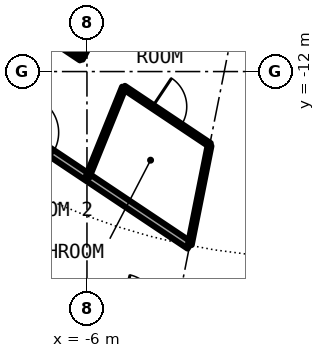
"""IFC4 building model, lengths in metres.
Left out: names, types, materials, properties, quantities, classifications, styles, units other than length and angle.
Written with IfcOpenShell. Run it as: python <this file> out.ifc"""

import sys

from ifc_helpers import new_model, si_unit, direction, frame, frame_2d, origin, place, context, subcontext, project, spatial, rectangle, extrude, element, fill, save


model = new_model("IFC4")
c1 = context("Model", 3, precision=1e-05, world=origin(), true_north=direction((0.0, 1.0)))
c2 = subcontext(c1, "Body", "Model", "MODEL_VIEW")
j1 = project(units=[si_unit("LENGTHUNIT", "METRE"), si_unit("PLANEANGLEUNIT", "RADIAN")], contexts=[c1])
p1 = place(None, origin())
s1 = spatial("IfcSite", under=j1, at=p1, CompositionType="ELEMENT")
p2 = place(p1, origin())
s2 = spatial("IfcBuilding", under=s1, at=p2, CompositionType="ELEMENT")
p3 = place(p2, frame((0.0, 0.0, 31.95)))
s3 = spatial("IfcBuildingStorey", under=s2, at=p3, CompositionType="ELEMENT", Elevation=31.95)
p4 = place(p3, frame((-9.242, -17.284, 0.0), z_axis=(0.0, 0.0, 1.0), x_axis=(0.970002158938, -0.243096301198, 0.0)))
e1 = element("IfcWall", 1, at=p4, inside=s3, PredefinedType="PARTITIONING", context=c2, shape_type="SweptSolid", body=[
    extrude(rectangle(XDim=9.528, YDim=0.2, at=frame_2d((4.764, 0.0))), origin(), (0.0, 0.0, 1.0), 2.38),
])
p5 = place(p4, frame((4.262, 0.0, 0.0)))
e2 = element("IfcOpeningElement", 2, at=p5, cuts=e1, PredefinedType="OPENING", context=c2, shape_type="SweptSolid", body=[
    extrude(rectangle(XDim=1.0, YDim=2.3, at=frame_2d((0.5, 1.15))), frame((0.0, 0.11, 0.0), z_axis=(0.0, -1.0, 0.0), x_axis=(1.0, 0.0, 0.0)), (0.0, 0.0, 1.0), 0.22),
])
p6 = place(p3, frame((-14.036, -9.402, 0.0), z_axis=(0.0, 0.0, 1.0), x_axis=(0.831561346449, -0.555432918625, 0.0)))
e3 = element("IfcWall", 3, at=p6, inside=s3, PredefinedType="PARTITIONING", context=c2, shape_type="SweptSolid", body=[
    extrude(rectangle(XDim=12.914, YDim=0.2, at=frame_2d((6.457, 0.0))), origin(), (0.0, 0.0, 1.0), 2.7),
])
p7 = place(p6, frame((7.566, 0.0, 0.0)))
e4 = element("IfcOpeningElement", 4, at=p7, cuts=e3, PredefinedType="OPENING", context=c2, shape_type="SweptSolid", body=[
    extrude(rectangle(XDim=1.0, YDim=2.3, at=frame_2d((0.5, 1.15))), frame((0.0, 0.11, 0.0), z_axis=(0.0, -1.0, 0.0), x_axis=(1.0, 0.0, 0.0)), (0.0, 0.0, 1.0), 0.22),
])
p8 = place(p3, frame((-9.545, -9.401, 0.0), z_axis=(0.0, 0.0, 1.0), x_axis=(0.831459707426, -0.555585056429, 0.0)))
e5 = element("IfcWall", 5, at=p8, inside=s3, PredefinedType="PARTITIONING", context=c2, shape_type="SweptSolid", body=[
    extrude(rectangle(XDim=4.073, YDim=0.1, at=frame_2d((2.037, 0.0))), origin(), (0.0, 0.0, 1.0), 2.7),
])
p9 = place(p3, frame((-5.029, -12.418, 0.0), z_axis=(0.0, 0.0, 1.0), x_axis=(0.831538390496, -0.555467285384, 0.0)))
e6 = element("IfcWall", 6, at=p9, inside=s3, PredefinedType="PARTITIONING", context=c2, shape_type="SweptSolid", body=[
    extrude(rectangle(XDim=2.717, YDim=0.1, at=frame_2d((1.358, 0.0))), origin(), (0.0, 0.0, 1.0), 2.7),
])
p10 = place(p9, frame((0.908, 0.0, 0.0)))
e7 = element("IfcOpeningElement", 7, at=p10, cuts=e6, PredefinedType="OPENING", context=c2, shape_type="SweptSolid", body=[
    extrude(rectangle(XDim=0.9, YDim=2.3, at=frame_2d((0.45, 1.15))), frame((0.0, 0.06, 0.0), z_axis=(0.0, -1.0, 0.0), x_axis=(1.0, 0.0, 0.0)), (0.0, 0.0, 1.0), 0.12),
])
p11 = place(p3, frame((-6.159, -11.663, 0.0), z_axis=(0.0, 0.0, 1.0), x_axis=(0.466976820365, 0.884269556889, 0.0)))
e8 = element("IfcWall", 8, at=p11, inside=s3, PredefinedType="PARTITIONING", context=c2, shape_type="SweptSolid", body=[
    extrude(rectangle(XDim=5.469, YDim=0.1, at=frame_2d((2.735, 0.0))), origin(), (0.0, 0.0, 1.0), 2.7),
])
p12 = place(p11, frame((2.284, 0.0, 0.0)))
e9 = element("IfcOpeningElement", 9, at=p12, cuts=e8, PredefinedType="OPENING", context=c2, shape_type="SweptSolid", body=[
    extrude(rectangle(XDim=0.9, YDim=2.3, at=frame_2d((0.45, 1.15))), frame((0.0, 0.06, 0.0), z_axis=(0.0, -1.0, 0.0), x_axis=(1.0, 0.0, 0.0)), (0.0, 0.0, 1.0), 0.12),
])
p13 = place(p3, frame((-5.986, -14.779, 0.0), z_axis=(0.0, 0.0, 1.0), x_axis=(0.375649498413, 0.926761811008, 0.0)))
e10 = element("IfcWall", 10, at=p13, inside=s3, PredefinedType="PARTITIONING", context=c2, shape_type="SweptSolid", body=[
    extrude(rectangle(XDim=2.548, YDim=0.1, at=frame_2d((1.274, 0.0))), origin(), (0.0, 0.0, 1.0), 2.7),
])
p14 = place(p3, frame((-2.774, -13.948, 0.0), z_axis=(0.0, 0.0, 1.0), x_axis=(-0.195338620417, -0.980735858105, 0.0)))
e11 = element("IfcWall", 11, at=p14, inside=s3, PredefinedType="PARTITIONING", context=c2, shape_type="SweptSolid", body=[
    extrude(rectangle(XDim=2.657, YDim=0.1, at=frame_2d((1.329, 0.0))), origin(), (0.0, 0.0, 1.0), 2.7),
])
p15 = place(p7, origin())
e12 = element("IfcDoor", 12, at=p15, inside=s3, OperationType="SINGLE_SWING_RIGHT", PredefinedType="DOOR", context=c2, shape_type="SweptSolid", body=[
    extrude(rectangle(XDim=1.0, YDim=2.3, at=frame_2d((0.5, 1.15))), frame((0.0, 0.025, 0.0), z_axis=(0.0, -1.0, 0.0), x_axis=(1.0, 0.0, 0.0)), (0.0, 0.0, 1.0), 0.05),
])
fill(e4, e12)
p16 = place(p10, origin())
e13 = element("IfcDoor", 13, at=p16, inside=s3, OperationType="SINGLE_SWING_LEFT", PredefinedType="DOOR", context=c2, shape_type="SweptSolid", body=[
    extrude(rectangle(XDim=0.9, YDim=2.3, at=frame_2d((0.45, 1.15))), frame((0.0, 0.025, 0.0), z_axis=(0.0, -1.0, 0.0), x_axis=(1.0, 0.0, 0.0)), (0.0, 0.0, 1.0), 0.05),
])
fill(e7, e13)
save(model, sys.argv[1])
